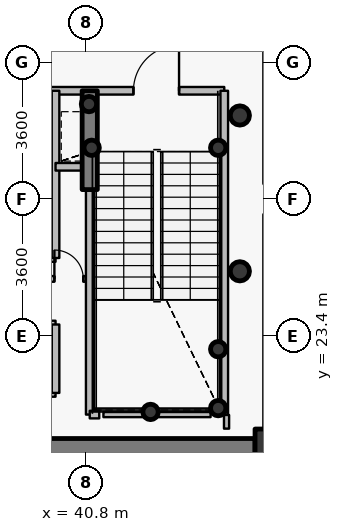
"""IFC4 building model, lengths in metres.
Left out: names, types, materials, properties, quantities, classifications, styles, units other than length and angle.
Written with IfcOpenShell. Run it as: python <this file> out.ifc"""

import sys

from ifc_helpers import new_model, si_unit, direction, frame, frame_2d, origin, origin_2d, place, context, subcontext, project, spatial, rectangle, hollow_circle, extrude, source, transform, mapped, element, fill, save


model = new_model("IFC4")
c1 = context("Model", 3, precision=1e-05, world=origin(), true_north=direction((0.0, 1.0)))
c2 = subcontext(c1, "Body", "Model", "MODEL_VIEW")
j1 = project(units=[si_unit("LENGTHUNIT", "METRE"), si_unit("PLANEANGLEUNIT", "RADIAN")], contexts=[c1])
p1 = place(None, origin())
s1 = spatial("IfcSite", under=j1, at=p1, CompositionType="ELEMENT")
p2 = place(p1, origin())
s2 = spatial("IfcBuilding", under=s1, at=p2, CompositionType="ELEMENT")
p3 = place(p2, frame((0.0, 0.0, 49.2)))
s3 = spatial("IfcBuildingStorey", under=s2, at=p3, CompositionType="ELEMENT", Elevation=49.2)
p4 = place(p3, frame((45.95, 20.25, 0.0), z_axis=(0.0, 0.0, 1.0), x_axis=(1.0, 0.0, 0.0)))
e1 = element("IfcColumn", 1, at=p4, inside=s3, PredefinedType="COLUMN", context=c2, shape_type="SweptSolid", body=[
    extrude(rectangle(XDim=1.4, YDim=1.4, at=origin_2d()), origin(), (0.0, 0.0, 1.0), 4.2),
])
for number, where, z_axis, x_axis in (
    (2, (44.28, 21.5, 0.0), (0.0, 0.0, 1.0), (1.0, 0.0, 0.0)),
    (3, (44.28, 23.05, 0.0), (0.0, 0.0, 1.0), (1.0, 0.0, 0.0)),
    (4, (42.5, 21.4, 0.0), (0.0, 0.0, 1.0), (1.0, 0.0, 0.0)),
    (5, (40.95, 28.35, 0.0), (0.0, 0.0, 1.0), (1.0, 0.0, 0.0)),
    (6, (44.28, 28.35, 0.0), (0.0, 0.0, 1.0), (1.0, 0.0, 0.0)),
    (7, (40.88, 29.5, 0.0), (0.0, 0.0, 1.0), (1.0, 0.0, 0.0)),
):
    element("IfcColumn", number, at=place(p3, frame(where, z_axis=z_axis, x_axis=x_axis)), inside=s3, PredefinedType="COLUMN", context=c2, shape_type="SweptSolid", body=[
        extrude(hollow_circle(Radius=0.203, WallThickness=0.016, at=origin_2d()), origin(), (0.0, 0.0, 1.0), 4.2),
    ])
p5 = place(p3, frame((45.25, 20.25, 0.0), z_axis=(0.0, 0.0, 1.0), x_axis=(-1.0, 0.0, 0.0)))
e8 = element("IfcWall", 8, at=p5, inside=s3, PredefinedType="SHEAR", context=c2, shape_type="SweptSolid", body=[
    extrude(rectangle(XDim=18.5, YDim=0.9, at=frame_2d((9.25, 0.0))), origin(), (0.0, 0.0, 1.0), 3.4),
])
p6 = place(p5, frame((10.0, 0.0, 0.0)))
e9 = element("IfcOpeningElement", 9, at=p6, cuts=e8, PredefinedType="OPENING", context=c2, shape_type="SweptSolid", body=[
    extrude(rectangle(XDim=1.15, YDim=2.15, at=origin_2d()), frame((0.575, 0.46, 1.075), z_axis=(0.0, -1.0, 0.0), x_axis=(1.0, 0.0, 0.0)), (0.0, 0.0, 1.0), 0.92),
])
p7 = place(p3, frame((40.9, 27.25, 0.0), z_axis=(0.0, 0.0, 1.0), x_axis=(0.0, 1.0, 0.0)))
e10 = element("IfcWall", 10, at=p7, inside=s3, PredefinedType="SHEAR", context=c2, shape_type="SweptSolid", body=[
    extrude(rectangle(XDim=2.6, YDim=0.4, at=frame_2d((1.3, 0.0))), origin(), (0.0, 0.0, 1.0), 3.55),
])
for number, where, z_axis, x_axis in (
    (11, (44.85, 25.1, 0.0), (0.0, 0.0, 1.0), (1.0, 0.0, 0.0)),
    (12, (44.85, 29.2, 0.0), (0.0, 0.0, 1.0), (1.0, 0.0, 0.0)),
):
    element("IfcColumn", number, at=place(p3, frame(where, z_axis=z_axis, x_axis=x_axis)), inside=s3, PredefinedType="COLUMN", context=c2, shape_type="SweptSolid", body=[
        extrude(hollow_circle(Radius=0.254, WallThickness=0.02, at=origin_2d()), origin(), (0.0, 0.0, 1.0), 4.2),
    ])
p8 = place(p3, frame((35.05, 27.25, 0.0), z_axis=(0.0, 0.0, 1.0), x_axis=(1.0, 0.0, 0.0)))
e13 = element("IfcWall", 13, at=p8, inside=s3, PredefinedType="PARTITIONING", context=c2, shape_type="SweptSolid", body=[
    extrude(rectangle(XDim=4.95, YDim=0.2, at=frame_2d((2.475, 0.0))), origin(), (0.0, 0.0, 1.0), 3.535),
])
p9 = place(p3, frame((35.45, 23.7, 0.0), z_axis=(0.0, 0.0, 1.0), x_axis=(1.0, 0.0, 0.0)))
e14 = element("IfcWall", 14, at=p9, inside=s3, PredefinedType="PARTITIONING", context=c2, shape_type="SweptSolid", body=[
    extrude(rectangle(XDim=4.55, YDim=0.2, at=frame_2d((2.275, 0.0))), origin(), (0.0, 0.0, 1.0), 3.535),
])
p10 = place(p9, frame((0.25, 0.0, 0.0)))
e15 = element("IfcOpeningElement", 15, at=p10, cuts=e14, PredefinedType="OPENING", context=c2, shape_type="SweptSolid", body=[
    extrude(rectangle(XDim=1.05, YDim=2.15, at=origin_2d()), frame((0.525, 0.11, 1.075), z_axis=(0.0, -1.0, 0.0), x_axis=(1.0, 0.0, 0.0)), (0.0, 0.0, 1.0), 0.22),
])
p11 = place(p9, frame((1.745, 0.0, 0.0)))
e16 = element("IfcOpeningElement", 16, at=p11, cuts=e14, PredefinedType="OPENING", context=c2, shape_type="SweptSolid", body=[
    extrude(rectangle(XDim=1.05, YDim=2.15, at=origin_2d()), frame((0.525, 0.11, 1.075), z_axis=(0.0, -1.0, 0.0), x_axis=(1.0, 0.0, 0.0)), (0.0, 0.0, 1.0), 0.22),
])
p12 = place(p9, frame((3.165, 0.0, 0.0)))
e17 = element("IfcOpeningElement", 17, at=p12, cuts=e14, PredefinedType="OPENING", context=c2, shape_type="SweptSolid", body=[
    extrude(rectangle(XDim=1.05, YDim=2.15, at=origin_2d()), frame((0.525, 0.11, 1.075), z_axis=(0.0, -1.0, 0.0), x_axis=(1.0, 0.0, 0.0)), (0.0, 0.0, 1.0), 0.22),
])
p13 = place(p3, frame((35.45, 25.45, 0.0), z_axis=(0.0, 0.0, 1.0), x_axis=(1.0, 0.0, 0.0)))
e18 = element("IfcWall", 18, at=p13, inside=s3, PredefinedType="PARTITIONING", context=c2, shape_type="SweptSolid", body=[
    extrude(rectangle(XDim=4.55, YDim=0.2, at=frame_2d((2.275, 0.0))), origin(), (0.0, 0.0, 1.0), 3.535),
])
p14 = place(p3, frame((35.95, 29.85, 0.0), z_axis=(0.0, 0.0, 1.0), x_axis=(1.0, 0.0, 0.0)))
e19 = element("IfcWall", 19, at=p14, inside=s3, PredefinedType="PARTITIONING", context=c2, shape_type="SweptSolid", body=[
    extrude(rectangle(XDim=8.49, YDim=0.2, at=frame_2d((4.245, 0.0))), origin(), (0.0, 0.0, 1.0), 3.535),
])
p15 = place(p14, frame((6.1, 0.0, 0.0)))
e20 = element("IfcOpeningElement", 20, at=p15, cuts=e19, PredefinedType="OPENING", context=c2, shape_type="SweptSolid", body=[
    extrude(rectangle(XDim=1.2, YDim=2.15, at=origin_2d()), frame((0.6, 0.11, 1.075), z_axis=(0.0, -1.0, 0.0), x_axis=(1.0, 0.0, 0.0)), (0.0, 0.0, 1.0), 0.22),
])
p16 = place(p14, frame((0.37, 0.0, 0.0)))
e21 = element("IfcOpeningElement", 21, at=p16, cuts=e19, PredefinedType="OPENING", context=c2, shape_type="SweptSolid", body=[
    extrude(rectangle(XDim=1.15, YDim=2.15, at=origin_2d()), frame((0.575, 0.11, 1.075), z_axis=(0.0, -1.0, 0.0), x_axis=(1.0, 0.0, 0.0)), (0.0, 0.0, 1.0), 0.22),
])
p17 = place(p14, frame((2.425, 0.0, 0.0)))
e22 = element("IfcOpeningElement", 22, at=p17, cuts=e19, PredefinedType="OPENING", context=c2, shape_type="SweptSolid", body=[
    extrude(rectangle(XDim=1.05, YDim=2.15, at=origin_2d()), frame((0.525, 0.11, 1.075), z_axis=(0.0, -1.0, 0.0), x_axis=(1.0, 0.0, 0.0)), (0.0, 0.0, 1.0), 0.22),
])
p18 = place(p3, frame((39.8, 21.9, 0.0), z_axis=(0.0, 0.0, 1.0), x_axis=(1.0, 0.0, 0.0)))
e23 = element("IfcWall", 23, at=p18, inside=s3, PredefinedType="PARTITIONING", context=c2, shape_type="SweptSolid", body=[
    extrude(rectangle(XDim=0.2, YDim=0.2, at=frame_2d((0.1, 0.0))), origin(), (0.0, 0.0, 1.0), 3.95),
])
p19 = place(p3, frame((39.8, 24.9, 0.0), z_axis=(0.0, 0.0, 1.0), x_axis=(1.0, 0.0, 0.0)))
e24 = element("IfcWall", 24, at=p19, inside=s3, PredefinedType="PARTITIONING", context=c2, shape_type="SweptSolid", body=[
    extrude(rectangle(XDim=1.1, YDim=0.15, at=frame_2d((0.55, 0.0))), origin(), (0.0, 0.0, 1.0), 3.95),
])
p20 = place(p19, frame((0.17, 0.0, 0.0)))
e25 = element("IfcOpeningElement", 25, at=p20, cuts=e24, PredefinedType="OPENING", context=c2, shape_type="SweptSolid", body=[
    extrude(rectangle(XDim=0.76, YDim=2.1, at=origin_2d()), frame((0.38, 0.085, 1.05), z_axis=(0.0, -1.0, 0.0), x_axis=(1.0, 0.0, 0.0)), (0.0, 0.0, 1.0), 0.17),
])
p21 = place(p3, frame((40.0, 21.9, 0.0), z_axis=(0.0, 0.0, 1.0), x_axis=(0.0, 1.0, 0.0)))
e26 = element("IfcWall", 26, at=p21, inside=s3, PredefinedType="PARTITIONING", context=c2, shape_type="SweptSolid", body=[
    extrude(rectangle(XDim=1.8, YDim=0.2, at=frame_2d((0.9, 0.0))), origin(), (0.0, 0.0, 1.0), 3.95),
])
p22 = place(p3, frame((40.0, 25.45, 0.0), z_axis=(0.0, 0.0, 1.0), x_axis=(0.0, 1.0, 0.0)))
e27 = element("IfcWall", 27, at=p22, inside=s3, PredefinedType="PARTITIONING", context=c2, shape_type="SweptSolid", body=[
    extrude(rectangle(XDim=4.4, YDim=0.2, at=frame_2d((2.2, 0.0))), origin(), (0.0, 0.0, 1.0), 3.95),
])
p23 = place(p3, frame((40.0, 27.85, 0.0), z_axis=(0.0, 0.0, 1.0), x_axis=(1.0, 0.0, 0.0)))
e28 = element("IfcWall", 28, at=p23, inside=s3, PredefinedType="PARTITIONING", context=c2, shape_type="SweptSolid", body=[
    extrude(rectangle(XDim=0.9, YDim=0.2, at=frame_2d((0.45, 0.0))), origin(), (0.0, 0.0, 1.0), 3.95),
])
p24 = place(p3, frame((40.9, 21.33, 0.0), z_axis=(0.0, 0.0, 1.0), x_axis=(0.0, 1.0, 0.0)))
e29 = element("IfcWall", 29, at=p24, inside=s3, PredefinedType="PARTITIONING", context=c2, shape_type="SweptSolid", body=[
    extrude(rectangle(XDim=5.91, YDim=0.2, at=frame_2d((2.955, 0.0))), origin(), (0.0, 0.0, 1.0), 3.485),
])
p25 = place(p3, frame((40.9, 21.33, 0.0), z_axis=(0.0, 0.0, 1.0), x_axis=(1.0, 0.0, 0.0)))
e30 = element("IfcWall", 30, at=p25, inside=s3, PredefinedType="PARTITIONING", context=c2, shape_type="SweptSolid", body=[
    extrude(rectangle(XDim=0.25, YDim=0.2, at=frame_2d((0.125, 0.0))), origin(), (0.0, 0.0, 1.0), 3.485),
])
p26 = place(p3, frame((44.44, 21.33, 0.0), z_axis=(0.0, 0.0, 1.0), x_axis=(0.0, 1.0, 0.0)))
e31 = element("IfcWall", 31, at=p26, inside=s3, PredefinedType="PARTITIONING", context=c2, shape_type="SweptSolid", body=[
    extrude(rectangle(XDim=8.52, YDim=0.2, at=frame_2d((4.26, 0.0))), origin(), (0.0, 0.0, 1.0), 3.95),
])
p27 = place(p3, frame((44.08, 21.33, 0.0), z_axis=(0.0, 0.0, 1.0), x_axis=(-1.0, 0.0, 0.0)))
e32 = element("IfcWall", 32, at=p27, inside=s3, PredefinedType="PARTITIONING", context=c2, shape_type="SweptSolid", body=[
    extrude(rectangle(XDim=2.82, YDim=0.135, at=frame_2d((1.41, 0.0))), origin(), (0.0, 0.0, 1.0), 3.485),
])
p28 = place(p3, frame((44.5, 20.96, 0.0), z_axis=(0.0, 0.0, 1.0), x_axis=(0.0, 1.0, 0.0)))
e33 = element("IfcWall", 33, at=p28, inside=s3, PredefinedType="PARTITIONING", context=c2, shape_type="SweptSolid", body=[
    extrude(rectangle(XDim=0.36, YDim=0.135, at=frame_2d((0.18, 0.0))), origin(), (0.0, 0.0, 1.0), 3.95),
])
m1 = source(origin(), c2, "Body", "SweptSolid", [
    extrude(rectangle(XDim=1.2, YDim=2.15, at=origin_2d()), frame((0.6, 0.025, 1.075), z_axis=(0.0, -1.0, 0.0), x_axis=(1.0, 0.0, 0.0)), (0.0, 0.0, 1.0), 0.05),
])
p29 = place(p15, origin())
e34 = element("IfcDoor", 34, at=p29, inside=s3, OperationType="SINGLE_SWING_RIGHT", PredefinedType="DOOR", context=c2, shape_type="MappedRepresentation", body=[
    mapped(m1, transform((0.0, 0.0, 0.0), x_axis=(1.0, 0.0, 0.0), y_axis=(0.0, 1.0, 0.0), z_axis=(0.0, 0.0, 1.0), scale=1.0)),
])
fill(e20, e34)
m2 = source(origin(), c2, "Body", "SweptSolid", [
    extrude(rectangle(XDim=0.76, YDim=2.1, at=origin_2d()), frame((0.38, 0.025, 1.05), z_axis=(0.0, -1.0, 0.0), x_axis=(1.0, 0.0, 0.0)), (0.0, 0.0, 1.0), 0.05),
])
p30 = place(p20, origin())
e35 = element("IfcDoor", 35, at=p30, inside=s3, OperationType="SINGLE_SWING_LEFT", PredefinedType="DOOR", context=c2, shape_type="MappedRepresentation", body=[
    mapped(m2, transform((0.0, 0.0, 0.0), x_axis=(1.0, 0.0, 0.0), y_axis=(0.0, 1.0, 0.0), z_axis=(0.0, 0.0, 1.0), scale=1.0)),
])
fill(e25, e35)
save(model, sys.argv[1])
